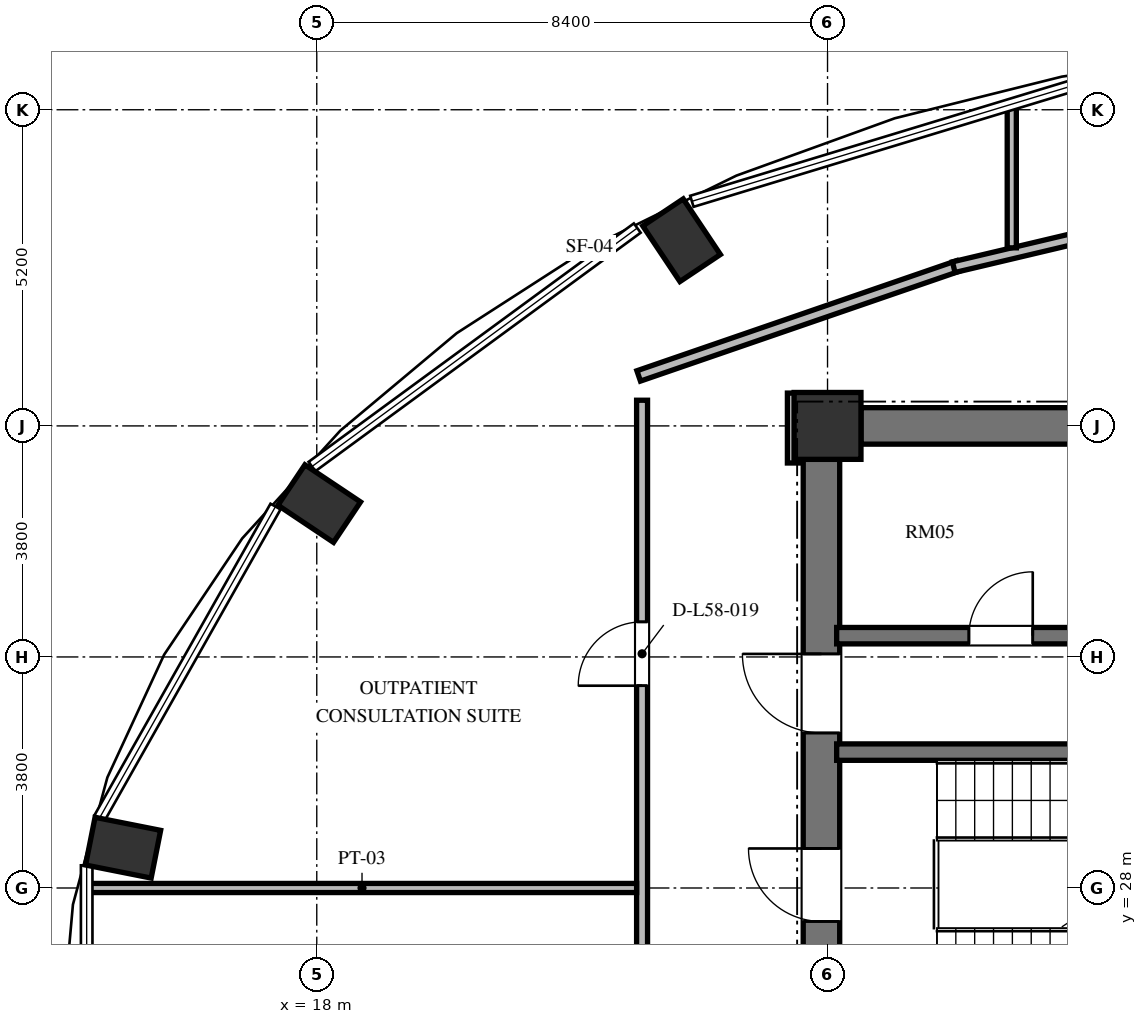
"""IFC4 building model, lengths in metres.
Left out: names, types, materials, properties, quantities, classifications, styles, units other than length and angle.
Written with IfcOpenShell. Run it as: python <this file> out.ifc"""

import sys

from ifc_helpers import new_model, si_unit, direction, frame, frame_2d, origin, origin_2d, place, context, subcontext, project, spatial, rectangle, extrude, element, fill, save


model = new_model("IFC4")
c1 = context("Model", 3, precision=1e-05, world=origin(), true_north=direction((0.0, 1.0)))
c2 = subcontext(c1, "Body", "Model", "MODEL_VIEW")
j1 = project(units=[si_unit("LENGTHUNIT", "METRE"), si_unit("PLANEANGLEUNIT", "RADIAN")], contexts=[c1])
p1 = place(None, origin())
s1 = spatial("IfcSite", under=j1, at=p1, CompositionType="ELEMENT")
p2 = place(p1, origin())
s2 = spatial("IfcBuilding", under=s1, at=p2, CompositionType="ELEMENT")
p3 = place(p2, frame((0.0, 0.0, 224.016)))
s3 = spatial("IfcBuildingStorey", under=s2, at=p3, CompositionType="ELEMENT", Elevation=224.016)
for number, where, z_axis, x_axis in (
    (1, (24.0, 38.654, 0.0), (0.0, 0.0, 1.0), (-0.556, 0.831, 0.0)),
    (2, (18.04, 34.323, 0.0), (0.0, 0.0, 1.0), (-0.831, 0.556, 0.0)),
    (3, (14.815, 28.663, 0.0), (0.0, 0.0, 1.0), (-0.981, 0.195, 0.0)),
):
    element("IfcColumn", number, at=place(p3, frame(where, z_axis=z_axis, x_axis=x_axis)), inside=s3, PredefinedType="COLUMN", context=c2, shape_type="SweptSolid", body=[
        extrude(rectangle(XDim=1.1, YDim=0.8, at=origin_2d()), origin(), (0.0, 0.0, 1.0), 3.648),
    ])
p4 = place(p3, frame((26.4, 35.6, 0.0), z_axis=(0.0, 0.0, 1.0), x_axis=(1.0, 0.0, 0.0)))
e4 = element("IfcColumn", 4, at=p4, inside=s3, PredefinedType="COLUMN", context=c2, shape_type="SweptSolid", body=[
    extrude(rectangle(XDim=1.1, YDim=1.1, at=origin_2d()), origin(), (0.0, 0.0, 1.0), 3.648),
])
p5 = place(p3, frame((26.3, 20.95, 0.0), z_axis=(0.0, 0.0, 1.0), x_axis=(0.0, 1.0, 0.0)))
e5 = element("IfcWall", 5, at=p5, inside=s3, PredefinedType="SHEAR", context=c2, shape_type="SweptSolid", body=[
    extrude(rectangle(XDim=14.1, YDim=0.6, at=frame_2d((7.05, 0.0))), origin(), (0.0, 0.0, 1.0), 3.648),
])
p6 = place(p5, frame((6.5, 0.0, 0.0)))
e6 = element("IfcOpeningElement", 6, at=p6, cuts=e5, PredefinedType="OPENING", context=c2, shape_type="SweptSolid", body=[
    extrude(rectangle(XDim=1.2, YDim=2.15, at=frame_2d((0.6, 1.075))), frame((0.0, 0.31, 0.0), z_axis=(0.0, -1.0, 0.0), x_axis=(1.0, 0.0, 0.0)), (0.0, 0.0, 1.0), 0.62),
])
p7 = place(p5, frame((9.6, 0.0, 0.0)))
e7 = element("IfcOpeningElement", 7, at=p7, cuts=e5, PredefinedType="OPENING", context=c2, shape_type="SweptSolid", body=[
    extrude(rectangle(XDim=1.3, YDim=2.2, at=frame_2d((0.65, 1.1))), frame((0.0, 0.31, 0.0), z_axis=(0.0, -1.0, 0.0), x_axis=(1.0, 0.0, 0.0)), (0.0, 0.0, 1.0), 0.62),
])
p8 = place(p5, frame((3.26, 0.0, 0.0)))
e8 = element("IfcOpeningElement", 8, at=p8, cuts=e5, PredefinedType="OPENING", context=c2, shape_type="SweptSolid", body=[
    extrude(rectangle(XDim=1.3, YDim=2.2, at=frame_2d((0.65, 1.1))), frame((0.0, 0.31, 0.0), z_axis=(0.0, -1.0, 0.0), x_axis=(1.0, 0.0, 0.0)), (0.0, 0.0, 1.0), 0.62),
])
p9 = place(p3, frame((26.95, 35.6, 0.0), z_axis=(0.0, 0.0, 1.0), x_axis=(1.0, 0.0, 0.0)))
e9 = element("IfcWall", 9, at=p9, inside=s3, PredefinedType="SHEAR", context=c2, shape_type="SweptSolid", body=[
    extrude(rectangle(XDim=5.45, YDim=0.6, at=frame_2d((2.725, 0.0))), origin(), (0.0, 0.0, 1.0), 3.648),
])
p10 = place(p3, frame((26.55, 30.235, 0.0), z_axis=(0.0, 0.0, 1.0), x_axis=(1.0, 0.0, 0.0)))
e10 = element("IfcWall", 10, at=p10, inside=s3, PredefinedType="SHEAR", context=c2, shape_type="SweptSolid", body=[
    extrude(rectangle(XDim=7.985, YDim=0.27, at=frame_2d((3.992, 0.0))), origin(), (0.0, 0.0, 1.0), 3.648),
])
p11 = place(p3, frame((26.55, 32.15, 0.0), z_axis=(0.0, 0.0, 1.0), x_axis=(1.0, 0.0, 0.0)))
e11 = element("IfcWall", 11, at=p11, inside=s3, PredefinedType="SHEAR", context=c2, shape_type="SweptSolid", body=[
    extrude(rectangle(XDim=16.4, YDim=0.27, at=frame_2d((8.2, 0.0))), origin(), (0.0, 0.0, 1.0), 3.648),
])
p12 = place(p11, frame((2.175, 0.0, 0.0)))
e12 = element("IfcOpeningElement", 12, at=p12, cuts=e11, PredefinedType="OPENING", context=c2, shape_type="SweptSolid", body=[
    extrude(rectangle(XDim=1.05, YDim=2.15, at=frame_2d((0.525, 1.075))), frame((0.0, 0.145, 0.0), z_axis=(0.0, -1.0, 0.0), x_axis=(1.0, 0.0, 0.0)), (0.0, 0.0, 1.0), 0.29),
])
p13 = place(p11, frame((7.575, 0.0, 0.0)))
e13 = element("IfcOpeningElement", 13, at=p13, cuts=e11, PredefinedType="OPENING", context=c2, shape_type="SweptSolid", body=[
    extrude(rectangle(XDim=1.05, YDim=2.15, at=frame_2d((0.525, 1.075))), frame((0.0, 0.145, 0.0), z_axis=(0.0, -1.0, 0.0), x_axis=(1.0, 0.0, 0.0)), (0.0, 0.0, 1.0), 0.29),
])
p14 = place(p11, frame((11.9, 0.0, 0.0)))
e14 = element("IfcOpeningElement", 14, at=p14, cuts=e11, PredefinedType="OPENING", context=c2, shape_type="SweptSolid", body=[
    extrude(rectangle(XDim=1.1, YDim=2.2, at=frame_2d((0.55, 1.1))), frame((0.0, 0.145, 0.0), z_axis=(0.0, -1.0, 0.0), x_axis=(1.0, 0.0, 0.0)), (0.0, 0.0, 1.0), 0.29),
])
p15 = place(p11, frame((14.5, 0.0, 0.0)))
e15 = element("IfcOpeningElement", 15, at=p15, cuts=e11, PredefinedType="OPENING", context=c2, shape_type="SweptSolid", body=[
    extrude(rectangle(XDim=1.1, YDim=2.2, at=frame_2d((0.55, 1.1))), frame((0.0, 0.145, 0.0), z_axis=(0.0, -1.0, 0.0), x_axis=(1.0, 0.0, 0.0)), (0.0, 0.0, 1.0), 0.29),
])
p16 = place(p3, frame((23.294, 36.422, 0.0), z_axis=(0.0, 0.0, 1.0), x_axis=(0.945493277461, 0.325641616316, 0.0)))
e16 = element("IfcWall", 16, at=p16, inside=s3, PredefinedType="PARTITIONING", context=c2, shape_type="SweptSolid", body=[
    extrude(rectangle(XDim=5.562, YDim=0.18, at=frame_2d((2.781, 0.0))), origin(), (0.0, 0.0, 1.0), 3.073),
])
p17 = place(p3, frame((28.476, 38.211, 0.0), z_axis=(0.0, 0.0, 1.0), x_axis=(0.973030562203, 0.230676234189, 0.0)))
e17 = element("IfcWall", 17, at=p17, inside=s3, PredefinedType="PARTITIONING", context=c2, shape_type="SweptSolid", body=[
    extrude(rectangle(XDim=2.377, YDim=0.18, at=frame_2d((1.188, 0.0))), origin(), (0.0, 0.0, 1.0), 3.448),
])
p18 = place(p3, frame((25.83, 36.14, 0.0), z_axis=(0.0, 0.0, 1.0), x_axis=(0.0, -1.0, 0.0)))
e18 = element("IfcWall", 18, at=p18, inside=s3, PredefinedType="PARTITIONING", context=c2, shape_type="SweptSolid", body=[
    extrude(rectangle(XDim=1.15, YDim=0.18, at=frame_2d((0.575, 0.0))), origin(), (0.0, 0.0, 1.0), 3.448),
])
p19 = place(p3, frame((23.35, 19.98, 0.0), z_axis=(0.0, 0.0, 1.0), x_axis=(0.0, 1.0, 0.0)))
e19 = element("IfcWall", 19, at=p19, inside=s3, PredefinedType="PARTITIONING", context=c2, shape_type="SweptSolid", body=[
    extrude(rectangle(XDim=16.042, YDim=0.18, at=frame_2d((8.021, 0.0))), origin(), (0.0, 0.0, 1.0), 3.448),
])
p20 = place(p19, frame((3.469, 0.0, 0.0)))
e20 = element("IfcOpeningElement", 20, at=p20, cuts=e19, PredefinedType="OPENING", context=c2, shape_type="SweptSolid", body=[
    extrude(rectangle(XDim=1.4, YDim=2.2, at=frame_2d((0.7, 1.1))), frame((0.0, 0.1, 0.0), z_axis=(0.0, -1.0, 0.0), x_axis=(1.0, 0.0, 0.0)), (0.0, 0.0, 1.0), 0.2),
])
p21 = place(p19, frame((11.347, 0.0, 0.0)))
e21 = element("IfcOpeningElement", 21, at=p21, cuts=e19, PredefinedType="OPENING", context=c2, shape_type="SweptSolid", body=[
    extrude(rectangle(XDim=1.05, YDim=2.15, at=frame_2d((0.525, 1.075))), frame((0.0, 0.1, 0.0), z_axis=(0.0, -1.0, 0.0), x_axis=(1.0, 0.0, 0.0)), (0.0, 0.0, 1.0), 0.2),
])
p22 = place(p3, frame((14.228, 28.0, 0.0), z_axis=(0.0, 0.0, 1.0), x_axis=(1.0, 0.0, 0.0)))
e22 = element("IfcWall", 22, at=p22, inside=s3, PredefinedType="PARTITIONING", context=c2, shape_type="SweptSolid", body=[
    extrude(rectangle(XDim=9.032, YDim=0.15, at=frame_2d((4.516, 0.0))), origin(), (0.0, 0.0, 1.0), 3.448),
])
p23 = place(p3, frame((29.43, 38.529, 0.0), z_axis=(0.0, 0.0, 1.0), x_axis=(0.0, 1.0, 0.0)))
e23 = element("IfcWall", 23, at=p23, inside=s3, PredefinedType="PARTITIONING", context=c2, shape_type="SweptSolid", body=[
    extrude(rectangle(XDim=2.346, YDim=0.15, at=frame_2d((1.173, 0.0))), origin(), (0.0, 0.0, 1.0), 3.448),
])
p24 = place(p6, origin())
e24 = element("IfcDoor", 24, at=p24, inside=s3, OperationType="SINGLE_SWING_RIGHT", PredefinedType="DOOR", context=c2, shape_type="SweptSolid", body=[
    extrude(rectangle(XDim=1.2, YDim=2.15, at=frame_2d((0.6, 1.075))), frame((0.0, 0.025, 0.0), z_axis=(0.0, -1.0, 0.0), x_axis=(1.0, 0.0, 0.0)), (0.0, 0.0, 1.0), 0.05),
])
fill(e6, e24)
p25 = place(p7, origin())
e25 = element("IfcDoor", 25, at=p25, inside=s3, OperationType="SINGLE_SWING_RIGHT", PredefinedType="DOOR", context=c2, shape_type="SweptSolid", body=[
    extrude(rectangle(XDim=1.3, YDim=2.2, at=frame_2d((0.65, 1.1))), frame((0.0, 0.025, 0.0), z_axis=(0.0, -1.0, 0.0), x_axis=(1.0, 0.0, 0.0)), (0.0, 0.0, 1.0), 0.05),
])
fill(e7, e25)
p26 = place(p12, origin())
e26 = element("IfcDoor", 26, at=p26, inside=s3, OperationType="SINGLE_SWING_RIGHT", PredefinedType="DOOR", context=c2, shape_type="SweptSolid", body=[
    extrude(rectangle(XDim=1.05, YDim=2.15, at=frame_2d((0.525, 1.075))), frame((0.0, 0.025, 0.0), z_axis=(0.0, -1.0, 0.0), x_axis=(1.0, 0.0, 0.0)), (0.0, 0.0, 1.0), 0.05),
])
fill(e12, e26)
p27 = place(p21, origin())
e27 = element("IfcDoor", 27, at=p27, inside=s3, OperationType="SINGLE_SWING_LEFT", PredefinedType="DOOR", context=c2, shape_type="SweptSolid", body=[
    extrude(rectangle(XDim=1.05, YDim=2.15, at=frame_2d((0.525, 1.075))), frame((0.0, 0.025, 0.0), z_axis=(0.0, -1.0, 0.0), x_axis=(1.0, 0.0, 0.0)), (0.0, 0.0, 1.0), 0.05),
])
fill(e21, e27)
save(model, sys.argv[1])
